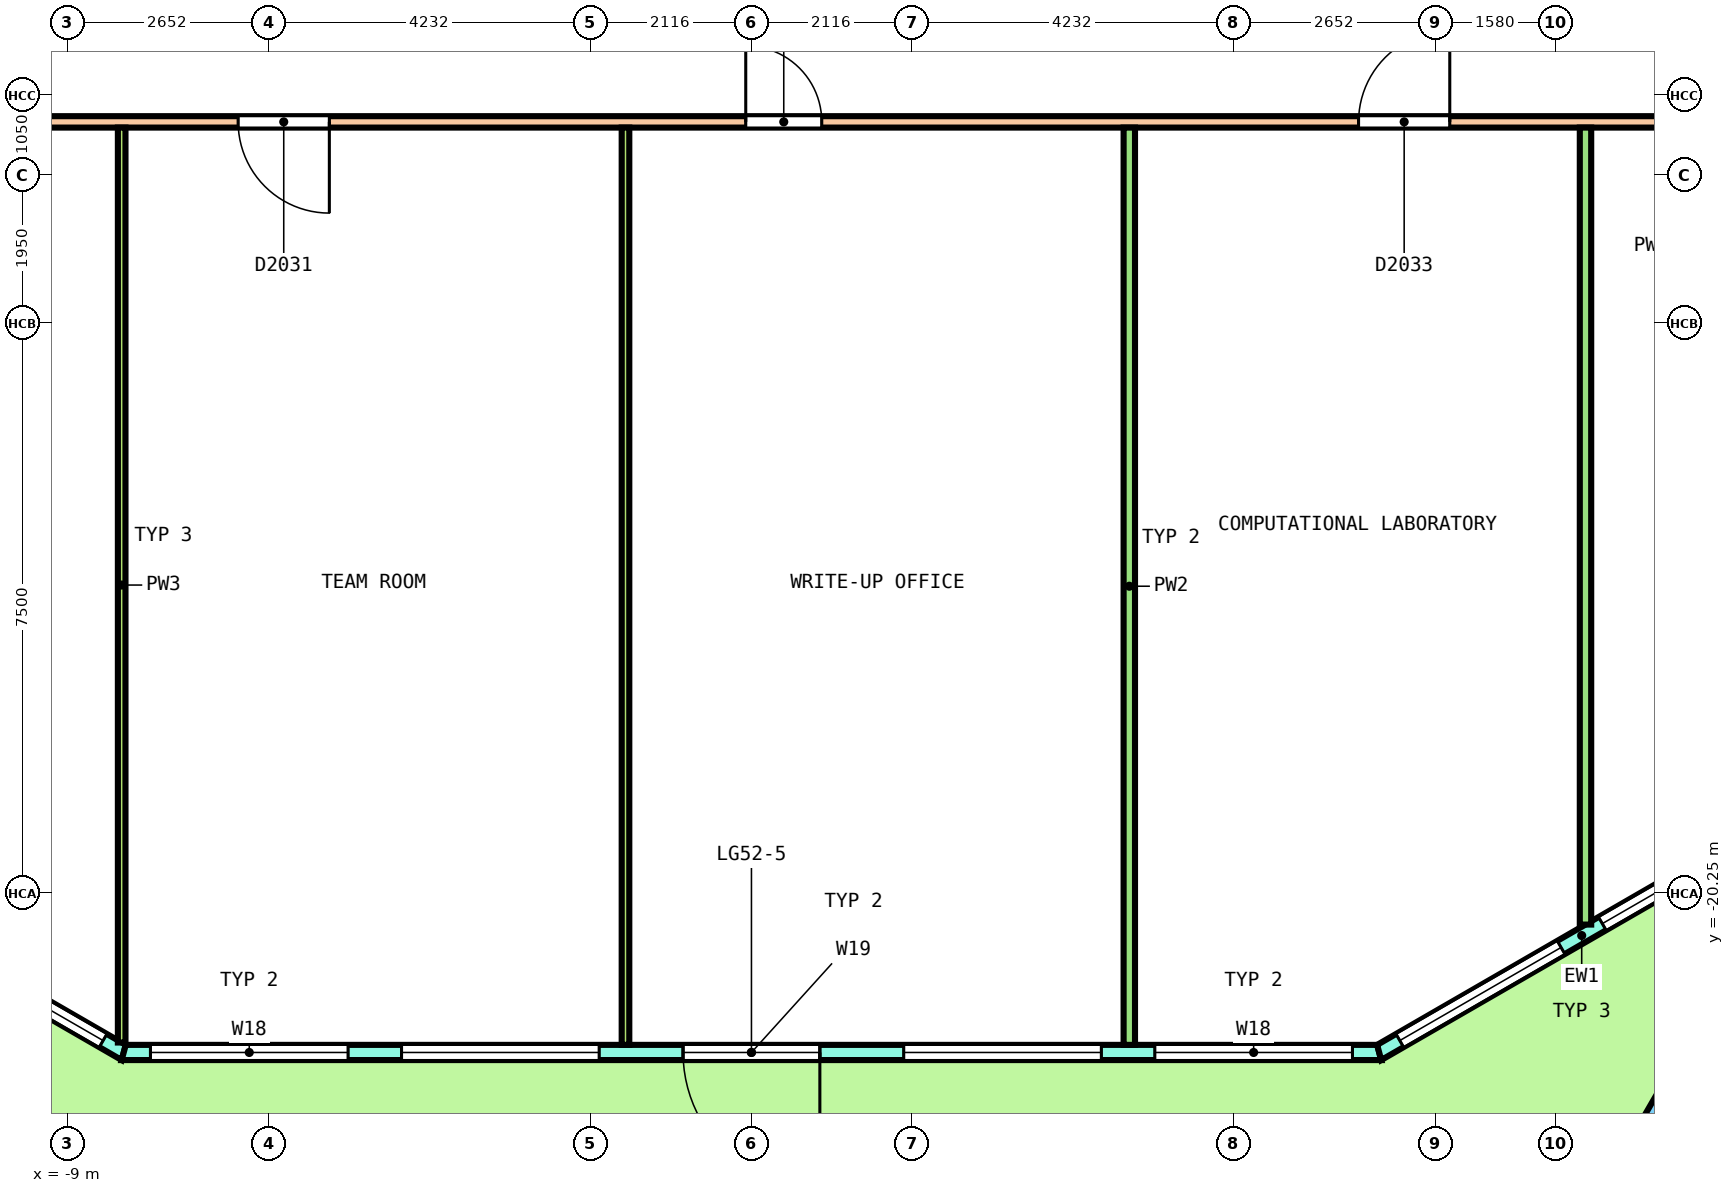
"""IFC4 building model, lengths in metres.
Left out: names, types, materials, properties, quantities, classifications, styles, units other than length and angle.
Written with IfcOpenShell. Run it as: python <this file> out.ifc"""

import sys

from ifc_helpers import new_model, si_unit, direction, frame, frame_2d, origin, origin_2d, place, context, subcontext, project, spatial, polyline, rectangle, outline, extrude, element, fill, save


model = new_model("IFC4")
c1 = context("Model", 3, precision=1e-05, world=origin(), true_north=direction((0.0, 1.0)))
c2 = subcontext(c1, "Body", "Model", "MODEL_VIEW")
j1 = project(units=[si_unit("LENGTHUNIT", "METRE"), si_unit("PLANEANGLEUNIT", "RADIAN")], contexts=[c1])
p1 = place(None, origin())
s1 = spatial("IfcSite", under=j1, at=p1, CompositionType="ELEMENT")
p2 = place(p1, origin())
s2 = spatial("IfcBuilding", under=s1, at=p2, CompositionType="ELEMENT")
p3 = place(p2, frame((0.0, 0.0, 241.4)))
s3 = spatial("IfcBuildingStorey", under=s2, at=p3, CompositionType="ELEMENT", Elevation=241.4)
p4 = place(p3, frame((12.323, -23.229, 0.0), z_axis=(-0.018180813073, -0.031348534306, 0.999343147989), x_axis=(0.866776681622, 0.497708117994, 0.031381737993)))
e1 = element("IfcColumn", 1, at=p4, inside=s3, PredefinedType="COLUMN", context=c2, shape_type="SweptSolid", body=[
    extrude(rectangle(XDim=1.05, YDim=1.05, at=origin_2d()), origin(), (0.0, 0.0, 1.0), 3.653),
])
p5 = place(p3, frame((-13.587, -19.266, 0.0), z_axis=(0.0, 0.0, 1.0), x_axis=(0.866029647142, -0.499992650217, 0.0)))
e2 = element("IfcWall", 2, at=p5, inside=s3, PredefinedType="SOLIDWALL", context=c2, shape_type="SweptSolid", body=[
    extrude(outline(polyline([(-0.027, -0.1), (1.008, -0.1), (2.042, -0.1), (3.076, -0.1), (4.111, -0.1), (5.145, -0.1), (6.18, -0.1), (6.126, 0.1), (5.109, 0.1), (4.093, 0.1), (3.076, 0.1), (2.06, 0.1), (1.043, 0.1), (0.027, 0.1), (-0.027, -0.1)])), origin(), (0.0, 0.0, 1.0), 3.7),
])
p6 = place(p5, frame((0.313, 0.0, 0.1)))
e3 = element("IfcOpeningElement", 3, at=p6, cuts=e2, PredefinedType="OPENING", context=c2, shape_type="SweptSolid", body=[
    extrude(rectangle(XDim=2.45, YDim=2.65, at=frame_2d((1.225, 1.325))), frame((0.0, 0.11, 0.0), z_axis=(0.0, -1.0, 0.0), x_axis=(1.0, 0.0, 0.0)), (0.0, 0.0, 1.0), 0.22),
])
p7 = place(p5, frame((3.39, 0.0, 0.1)))
e4 = element("IfcOpeningElement", 4, at=p7, cuts=e2, PredefinedType="OPENING", context=c2, shape_type="SweptSolid", body=[
    extrude(rectangle(XDim=2.45, YDim=2.65, at=frame_2d((1.225, 1.325))), frame((0.0, 0.11, 0.0), z_axis=(0.0, -1.0, 0.0), x_axis=(1.0, 0.0, 0.0)), (0.0, 0.0, 1.0), 0.22),
])
p8 = place(p3, frame((-8.259, -22.343, 0.0), z_axis=(0.0, 0.0, 1.0), x_axis=(1.0, 0.0, 0.0)))
e5 = element("IfcWall", 5, at=p8, inside=s3, PredefinedType="SOLIDWALL", context=c2, shape_type="SweptSolid", body=[
    extrude(outline(polyline([(-0.027, -0.1), (1.009, -0.1), (2.044, -0.1), (3.08, -0.1), (4.116, -0.1), (5.152, -0.1), (6.187, -0.1), (7.223, -0.1), (8.259, -0.1), (9.294, -0.1), (10.33, -0.1), (11.365, -0.1), (12.401, -0.1), (13.437, -0.1), (14.473, -0.1), (15.508, -0.1), (16.544, -0.1), (16.49, 0.1), (15.461, 0.1), (14.432, 0.1), (13.403, 0.1), (12.375, 0.1), (11.345, 0.1), (10.316, 0.1), (9.288, 0.1), (8.259, 0.1), (7.229, 0.1), (6.201, 0.1), (5.172, 0.1), (4.143, 0.1), (3.114, 0.1), (2.085, 0.1), (1.056, 0.1), (0.027, 0.1), (-0.027, -0.1)])), origin(), (0.0, 0.0, 1.0), 3.7),
])
p9 = place(p8, frame((0.352, 0.0, 0.1)))
e6 = element("IfcOpeningElement", 6, at=p9, cuts=e5, PredefinedType="OPENING", context=c2, shape_type="SweptSolid", body=[
    extrude(rectangle(XDim=2.6, YDim=2.65, at=frame_2d((1.3, 1.325))), frame((0.0, 0.11, 0.0), z_axis=(0.0, -1.0, 0.0), x_axis=(1.0, 0.0, 0.0)), (0.0, 0.0, 1.0), 0.22),
])
p10 = place(p8, frame((3.655, 0.0, 0.1)))
e7 = element("IfcOpeningElement", 7, at=p10, cuts=e5, PredefinedType="OPENING", context=c2, shape_type="SweptSolid", body=[
    extrude(rectangle(XDim=2.6, YDim=2.65, at=frame_2d((1.3, 1.325))), frame((0.0, 0.11, 0.0), z_axis=(0.0, -1.0, 0.0), x_axis=(1.0, 0.0, 0.0)), (0.0, 0.0, 1.0), 0.22),
])
p11 = place(p8, frame((7.359, 0.0, 0.0)))
e8 = element("IfcOpeningElement", 8, at=p11, cuts=e5, PredefinedType="OPENING", context=c2, shape_type="SweptSolid", body=[
    extrude(rectangle(XDim=1.8, YDim=2.4, at=frame_2d((0.9, 1.2))), frame((0.0, 0.11, 0.0), z_axis=(0.0, -1.0, 0.0), x_axis=(1.0, 0.0, 0.0)), (0.0, 0.0, 1.0), 0.22),
])
p12 = place(p8, frame((7.359, 0.0, 2.55)))
e9 = element("IfcOpeningElement", 9, at=p12, cuts=e5, PredefinedType="OPENING", context=c2, shape_type="SweptSolid", body=[
    extrude(rectangle(XDim=1.8, YDim=0.2, at=frame_2d((0.9, 0.1))), frame((0.0, 0.11, 0.0), z_axis=(0.0, -1.0, 0.0), x_axis=(1.0, 0.0, 0.0)), (0.0, 0.0, 1.0), 0.22),
])
p13 = place(p8, frame((10.262, 0.0, 0.1)))
e10 = element("IfcOpeningElement", 10, at=p13, cuts=e5, PredefinedType="OPENING", context=c2, shape_type="SweptSolid", body=[
    extrude(rectangle(XDim=2.6, YDim=2.65, at=frame_2d((1.3, 1.325))), frame((0.0, 0.11, 0.0), z_axis=(0.0, -1.0, 0.0), x_axis=(1.0, 0.0, 0.0)), (0.0, 0.0, 1.0), 0.22),
])
p14 = place(p8, frame((13.565, 0.0, 0.1)))
e11 = element("IfcOpeningElement", 11, at=p14, cuts=e5, PredefinedType="OPENING", context=c2, shape_type="SweptSolid", body=[
    extrude(rectangle(XDim=2.6, YDim=2.65, at=frame_2d((1.3, 1.325))), frame((0.0, 0.11, 0.0), z_axis=(0.0, -1.0, 0.0), x_axis=(1.0, 0.0, 0.0)), (0.0, 0.0, 1.0), 0.22),
])
p15 = place(p3, frame((8.259, -22.343, 0.0), z_axis=(0.0, 0.0, 1.0), x_axis=(0.866029647142, 0.499992650217, 0.0)))
e12 = element("IfcWall", 12, at=p15, inside=s3, PredefinedType="SOLIDWALL", context=c2, shape_type="SweptSolid", body=[
    extrude(outline(polyline([(-0.027, -0.1), (1.008, -0.1), (2.042, -0.1), (3.076, -0.1), (4.111, -0.1), (5.145, -0.1), (6.18, -0.1), (6.126, 0.1), (5.109, 0.1), (4.093, 0.1), (3.076, 0.1), (2.06, 0.1), (1.043, 0.1), (0.027, 0.1), (-0.027, -0.1)])), origin(), (0.0, 0.0, 1.0), 3.7),
])
p16 = place(p15, frame((0.313, 0.0, 0.1)))
e13 = element("IfcOpeningElement", 13, at=p16, cuts=e12, PredefinedType="OPENING", context=c2, shape_type="SweptSolid", body=[
    extrude(rectangle(XDim=2.45, YDim=2.65, at=frame_2d((1.225, 1.325))), frame((0.0, 0.11, 0.0), z_axis=(0.0, -1.0, 0.0), x_axis=(1.0, 0.0, 0.0)), (0.0, 0.0, 1.0), 0.22),
])
p17 = place(p15, frame((3.39, 0.0, 0.1)))
e14 = element("IfcOpeningElement", 14, at=p17, cuts=e12, PredefinedType="OPENING", context=c2, shape_type="SweptSolid", body=[
    extrude(rectangle(XDim=2.45, YDim=2.65, at=frame_2d((1.225, 1.325))), frame((0.0, 0.11, 0.0), z_axis=(0.0, -1.0, 0.0), x_axis=(1.0, 0.0, 0.0)), (0.0, 0.0, 1.0), 0.22),
])
p18 = place(p3, frame((-15.275, -10.1, 0.0), z_axis=(0.0, 0.0, 1.0), x_axis=(1.0, 0.0, 0.0)))
e15 = element("IfcWall", 15, at=p18, inside=s3, PredefinedType="PARTITIONING", context=c2, shape_type="SweptSolid", body=[
    extrude(rectangle(XDim=30.55, YDim=0.15, at=frame_2d((15.275, 0.0))), origin(), (0.0, 0.0, 1.0), 2.8),
])
p19 = place(p18, frame((3.181, 0.0, 0.0)))
e16 = element("IfcOpeningElement", 16, at=p19, cuts=e15, PredefinedType="OPENING", context=c2, shape_type="SweptSolid", body=[
    extrude(rectangle(XDim=1.2, YDim=2.1, at=frame_2d((0.6, 1.05))), frame((0.0, 0.085, 0.0), z_axis=(0.0, -1.0, 0.0), x_axis=(1.0, 0.0, 0.0)), (0.0, 0.0, 1.0), 0.17),
])
p20 = place(p18, frame((8.522, 0.0, 0.0)))
e17 = element("IfcOpeningElement", 17, at=p20, cuts=e15, PredefinedType="OPENING", context=c2, shape_type="SweptSolid", body=[
    extrude(rectangle(XDim=1.2, YDim=2.1, at=frame_2d((0.6, 1.05))), frame((0.0, 0.085, 0.0), z_axis=(0.0, -1.0, 0.0), x_axis=(1.0, 0.0, 0.0)), (0.0, 0.0, 1.0), 0.17),
])
p21 = place(p18, frame((15.2, 0.0, 0.0)))
e18 = element("IfcOpeningElement", 18, at=p21, cuts=e15, PredefinedType="OPENING", context=c2, shape_type="SweptSolid", body=[
    extrude(rectangle(XDim=1.0, YDim=2.1, at=frame_2d((0.5, 1.05))), frame((0.0, 0.085, 0.0), z_axis=(0.0, -1.0, 0.0), x_axis=(1.0, 0.0, 0.0)), (0.0, 0.0, 1.0), 0.17),
])
p22 = place(p18, frame((23.262, 0.0, 0.0)))
e19 = element("IfcOpeningElement", 19, at=p22, cuts=e15, PredefinedType="OPENING", context=c2, shape_type="SweptSolid", body=[
    extrude(rectangle(XDim=1.2, YDim=2.1, at=frame_2d((0.6, 1.05))), frame((0.0, 0.085, 0.0), z_axis=(0.0, -1.0, 0.0), x_axis=(1.0, 0.0, 0.0)), (0.0, 0.0, 1.0), 0.17),
])
p23 = place(p18, frame((28.493, 0.0, 0.0)))
e20 = element("IfcOpeningElement", 20, at=p23, cuts=e15, PredefinedType="OPENING", context=c2, shape_type="SweptSolid", body=[
    extrude(rectangle(XDim=1.0, YDim=2.1, at=frame_2d((0.5, 1.05))), frame((0.0, 0.085, 0.0), z_axis=(0.0, -1.0, 0.0), x_axis=(1.0, 0.0, 0.0)), (0.0, 0.0, 1.0), 0.17),
])
p24 = place(p3, frame((4.971, -22.243, 0.0), z_axis=(0.0, 0.0, 1.0), x_axis=(0.0, 1.0, 0.0)))
e21 = element("IfcWall", 21, at=p24, inside=s3, PredefinedType="PARTITIONING", context=c2, shape_type="SweptSolid", body=[
    extrude(rectangle(XDim=12.068, YDim=0.15, at=frame_2d((6.034, 0.0))), origin(), (0.0, 0.0, 1.0), 2.8),
])
p25 = place(p3, frame((10.973, -20.66, 0.0), z_axis=(0.0, 0.0, 1.0), x_axis=(0.0, 1.0, 0.0)))
e22 = element("IfcWall", 22, at=p25, inside=s3, PredefinedType="PARTITIONING", context=c2, shape_type="SweptSolid", body=[
    extrude(rectangle(XDim=10.485, YDim=0.15, at=frame_2d((5.243, 0.0))), origin(), (0.0, 0.0, 1.0), 2.8),
])
p26 = place(p3, frame((-8.285, -22.212, 0.0), z_axis=(0.0, 0.0, 1.0), x_axis=(0.0, 1.0, 0.0)))
e23 = element("IfcWall", 23, at=p26, inside=s3, PredefinedType="PARTITIONING", context=c2, shape_type="SweptSolid", body=[
    extrude(rectangle(XDim=12.037, YDim=0.1, at=frame_2d((6.019, 0.0))), origin(), (0.0, 0.0, 1.0), 2.8),
])
p27 = place(p3, frame((-1.657, -22.243, 0.0), z_axis=(0.0, 0.0, 1.0), x_axis=(0.0, 1.0, 0.0)))
e24 = element("IfcWall", 24, at=p27, inside=s3, PredefinedType="PARTITIONING", context=c2, shape_type="SweptSolid", body=[
    extrude(rectangle(XDim=12.068, YDim=0.1, at=frame_2d((6.034, 0.0))), origin(), (0.0, 0.0, 1.0), 2.8),
])
p28 = place(p7, origin())
e25 = element("IfcWindow", 25, at=p28, inside=s3, PartitioningType="SINGLE_PANEL", PredefinedType="WINDOW", context=c2, shape_type="SweptSolid", body=[
    extrude(rectangle(XDim=2.45, YDim=2.65, at=frame_2d((1.225, 1.325))), frame((0.0, 0.03, 0.0), z_axis=(0.0, -1.0, 0.0), x_axis=(1.0, 0.0, 0.0)), (0.0, 0.0, 1.0), 0.06),
])
fill(e4, e25)
p29 = place(p9, origin())
e26 = element("IfcWindow", 26, at=p29, inside=s3, PartitioningType="SINGLE_PANEL", PredefinedType="WINDOW", context=c2, shape_type="SweptSolid", body=[
    extrude(rectangle(XDim=2.6, YDim=2.65, at=frame_2d((1.3, 1.325))), frame((0.0, 0.03, 0.0), z_axis=(0.0, -1.0, 0.0), x_axis=(1.0, 0.0, 0.0)), (0.0, 0.0, 1.0), 0.06),
])
fill(e6, e26)
p30 = place(p10, origin())
e27 = element("IfcWindow", 27, at=p30, inside=s3, PartitioningType="SINGLE_PANEL", PredefinedType="WINDOW", context=c2, shape_type="SweptSolid", body=[
    extrude(rectangle(XDim=2.6, YDim=2.65, at=frame_2d((1.3, 1.325))), frame((0.0, 0.03, 0.0), z_axis=(0.0, -1.0, 0.0), x_axis=(1.0, 0.0, 0.0)), (0.0, 0.0, 1.0), 0.06),
])
fill(e7, e27)
p31 = place(p11, origin())
e28 = element("IfcDoor", 28, at=p31, inside=s3, OperationType="DOUBLE_DOOR_SINGLE_SWING", PredefinedType="DOOR", context=c2, shape_type="SweptSolid", body=[
    extrude(rectangle(XDim=1.8, YDim=2.4, at=frame_2d((0.9, 1.2))), frame((0.0, 0.025, 0.0), z_axis=(0.0, -1.0, 0.0), x_axis=(1.0, 0.0, 0.0)), (0.0, 0.0, 1.0), 0.05),
])
fill(e8, e28)
p32 = place(p12, origin())
e29 = element("IfcWindow", 29, at=p32, inside=s3, PartitioningType="SINGLE_PANEL", PredefinedType="WINDOW", context=c2, shape_type="SweptSolid", body=[
    extrude(rectangle(XDim=1.8, YDim=0.2, at=frame_2d((0.9, 0.1))), frame((0.0, 0.03, 0.0), z_axis=(0.0, -1.0, 0.0), x_axis=(1.0, 0.0, 0.0)), (0.0, 0.0, 1.0), 0.06),
])
fill(e9, e29)
p33 = place(p13, origin())
e30 = element("IfcWindow", 30, at=p33, inside=s3, PartitioningType="SINGLE_PANEL", PredefinedType="WINDOW", context=c2, shape_type="SweptSolid", body=[
    extrude(rectangle(XDim=2.6, YDim=2.65, at=frame_2d((1.3, 1.325))), frame((0.0, 0.03, 0.0), z_axis=(0.0, -1.0, 0.0), x_axis=(1.0, 0.0, 0.0)), (0.0, 0.0, 1.0), 0.06),
])
fill(e10, e30)
p34 = place(p14, origin())
e31 = element("IfcWindow", 31, at=p34, inside=s3, PartitioningType="SINGLE_PANEL", PredefinedType="WINDOW", context=c2, shape_type="SweptSolid", body=[
    extrude(rectangle(XDim=2.6, YDim=2.65, at=frame_2d((1.3, 1.325))), frame((0.0, 0.03, 0.0), z_axis=(0.0, -1.0, 0.0), x_axis=(1.0, 0.0, 0.0)), (0.0, 0.0, 1.0), 0.06),
])
fill(e11, e31)
p35 = place(p16, origin())
e32 = element("IfcWindow", 32, at=p35, inside=s3, PartitioningType="SINGLE_PANEL", PredefinedType="WINDOW", context=c2, shape_type="SweptSolid", body=[
    extrude(rectangle(XDim=2.45, YDim=2.65, at=frame_2d((1.225, 1.325))), frame((0.0, 0.03, 0.0), z_axis=(0.0, -1.0, 0.0), x_axis=(1.0, 0.0, 0.0)), (0.0, 0.0, 1.0), 0.06),
])
fill(e13, e32)
p36 = place(p17, origin())
e33 = element("IfcWindow", 33, at=p36, inside=s3, PartitioningType="SINGLE_PANEL", PredefinedType="WINDOW", context=c2, shape_type="SweptSolid", body=[
    extrude(rectangle(XDim=2.45, YDim=2.65, at=frame_2d((1.225, 1.325))), frame((0.0, 0.03, 0.0), z_axis=(0.0, -1.0, 0.0), x_axis=(1.0, 0.0, 0.0)), (0.0, 0.0, 1.0), 0.06),
])
fill(e14, e33)
p37 = place(p20, origin())
e34 = element("IfcDoor", 34, at=p37, inside=s3, OperationType="DOUBLE_DOOR_SINGLE_SWING", PredefinedType="DOOR", context=c2, shape_type="SweptSolid", body=[
    extrude(rectangle(XDim=1.2, YDim=2.1, at=frame_2d((0.6, 1.05))), frame((0.0, 0.025, 0.0), z_axis=(0.0, -1.0, 0.0), x_axis=(1.0, 0.0, 0.0)), (0.0, 0.0, 1.0), 0.05),
])
fill(e17, e34)
p38 = place(p21, origin())
e35 = element("IfcDoor", 35, at=p38, inside=s3, OperationType="SINGLE_SWING_RIGHT", PredefinedType="DOOR", context=c2, shape_type="SweptSolid", body=[
    extrude(rectangle(XDim=1.0, YDim=2.1, at=frame_2d((0.5, 1.05))), frame((0.0, 0.025, 0.0), z_axis=(0.0, -1.0, 0.0), x_axis=(1.0, 0.0, 0.0)), (0.0, 0.0, 1.0), 0.05),
])
fill(e18, e35)
p39 = place(p22, origin())
e36 = element("IfcDoor", 36, at=p39, inside=s3, OperationType="DOUBLE_DOOR_SINGLE_SWING", PredefinedType="DOOR", context=c2, shape_type="SweptSolid", body=[
    extrude(rectangle(XDim=1.2, YDim=2.1, at=frame_2d((0.6, 1.05))), frame((0.0, 0.025, 0.0), z_axis=(0.0, -1.0, 0.0), x_axis=(1.0, 0.0, 0.0)), (0.0, 0.0, 1.0), 0.05),
])
fill(e19, e36)
save(model, sys.argv[1])
